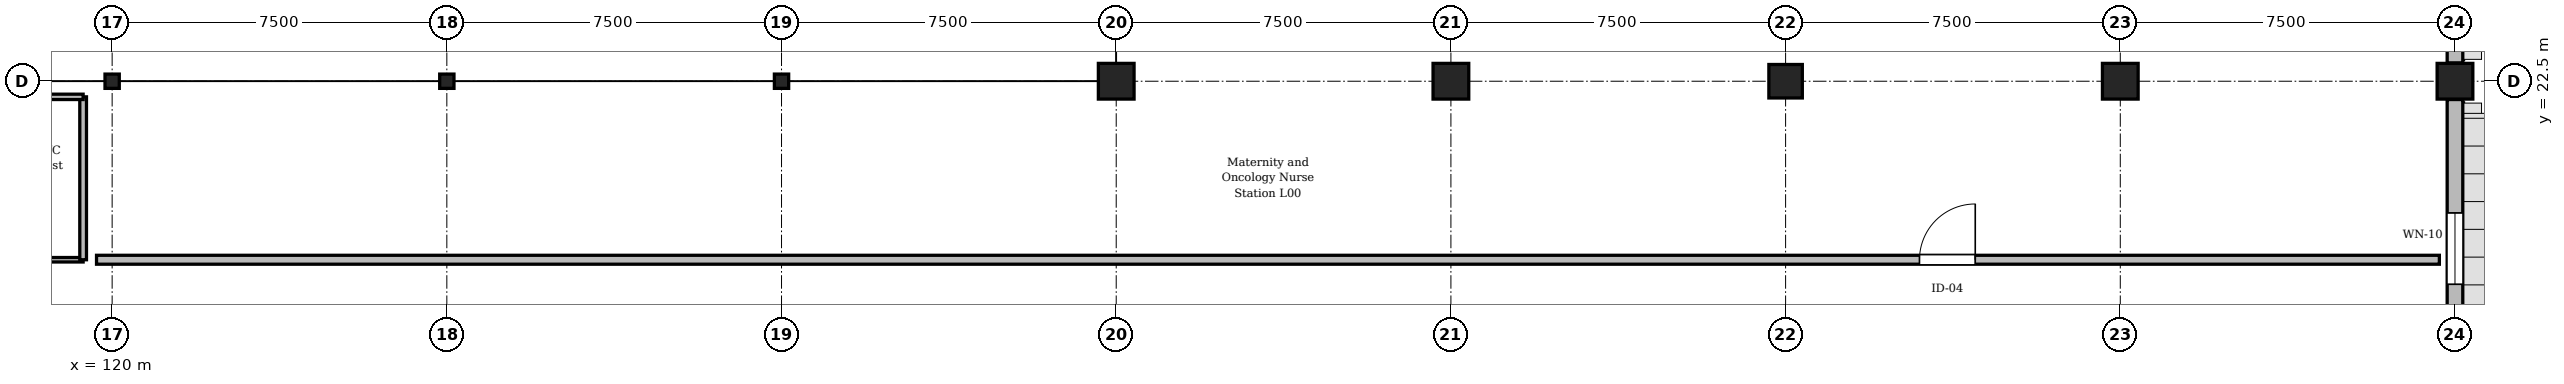
"""IFC4 building model, lengths in metres.
Left out: names, types, materials, properties, quantities, classifications, styles, units other than length and angle.
Written with IfcOpenShell. Run it as: python <this file> out.ifc"""

import sys

from ifc_helpers import new_model, si_unit, direction, frame, frame_2d, origin, origin_2d, place, context, subcontext, project, spatial, rectangle, circle, extrude, element, fill, save


model = new_model("IFC4")
c1 = context("Model", 3, precision=1e-05, world=origin(), true_north=direction((0.0, 1.0)))
c2 = subcontext(c1, "Body", "Model", "MODEL_VIEW")
j1 = project(units=[si_unit("LENGTHUNIT", "METRE"), si_unit("PLANEANGLEUNIT", "RADIAN")], contexts=[c1])
p1 = place(None, origin())
s1 = spatial("IfcSite", under=j1, at=p1, CompositionType="ELEMENT")
p2 = place(p1, origin())
s2 = spatial("IfcBuilding", under=s1, at=p2, CompositionType="ELEMENT")
p3 = place(p2, origin())
s3 = spatial("IfcBuildingStorey", under=s2, at=p3, CompositionType="ELEMENT", Elevation=0.0)
for number, where, z_axis, x_axis in (
    (1, (120.0, 22.5, 0.0), (0.0, 0.0, 1.0), (1.0, 0.0, 0.0)),
    (2, (127.5, 22.5, 0.0), (0.0, 0.0, 1.0), (1.0, 0.0, 0.0)),
    (3, (135.0, 22.5, 0.0), (0.0, 0.0, 1.0), (1.0, 0.0, 0.0)),
):
    element("IfcColumn", number, at=place(p3, frame(where, z_axis=z_axis, x_axis=x_axis)), inside=s3, PredefinedType="COLUMN", context=c2, shape_type="SweptSolid", body=[
        extrude(rectangle(XDim=0.32, YDim=0.32, at=origin_2d()), origin(), (0.0, 0.0, 1.0), 4.8),
    ])
for number, where, z_axis, x_axis in (
    (4, (142.5, 22.5, 0.0), (0.0, 0.0, 1.0), (1.0, 0.0, 0.0)),
    (5, (150.0, 22.5, 0.0), (0.0, 0.0, 1.0), (1.0, 0.0, 0.0)),
):
    element("IfcColumn", number, at=place(p3, frame(where, z_axis=z_axis, x_axis=x_axis)), inside=s3, PredefinedType="COLUMN", context=c2, shape_type="SweptSolid", body=[
        extrude(rectangle(XDim=0.8, YDim=0.8, at=origin_2d()), origin(), (0.0, 0.0, 1.0), 4.8),
    ])
p4 = place(p3, frame((157.5, 22.5, 0.0), z_axis=(0.0, 0.0, 1.0), x_axis=(1.0, 0.0, 0.0)))
e6 = element("IfcColumn", 6, at=p4, inside=s3, PredefinedType="COLUMN", context=c2, shape_type="SweptSolid", body=[
    extrude(circle(Radius=0.375, at=origin_2d()), origin(), (0.0, 0.0, 1.0), 4.8),
])
for number, where, z_axis, x_axis in (
    (7, (165.0, 22.5, 0.0), (0.0, 0.0, 1.0), (1.0, 0.0, 0.0)),
    (8, (172.5, 22.5, 0.0), (0.0, 0.0, 1.0), (1.0, 0.0, 0.0)),
):
    element("IfcColumn", number, at=place(p3, frame(where, z_axis=z_axis, x_axis=x_axis)), inside=s3, PredefinedType="COLUMN", context=c2, shape_type="SweptSolid", body=[
        extrude(rectangle(XDim=0.8, YDim=0.8, at=origin_2d()), origin(), (0.0, 0.0, 1.0), 4.8),
    ])
p5 = place(p3, frame((172.5, 22.09, 0.0), z_axis=(0.0, 0.0, 1.0), x_axis=(0.0, -1.0, 0.0)))
e9 = element("IfcWall", 9, at=p5, inside=s3, PredefinedType="STANDARD", context=c2, shape_type="SweptSolid", body=[
    extrude(rectangle(XDim=6.68, YDim=0.35, at=frame_2d((3.34, 0.0))), origin(), (0.0, 0.0, 1.0), 3.9),
])
p6 = place(p5, frame((2.54, 0.0, 0.9)))
e10 = element("IfcOpeningElement", 10, at=p6, cuts=e9, PredefinedType="OPENING", context=c2, shape_type="SweptSolid", body=[
    extrude(rectangle(XDim=1.6, YDim=1.95, at=frame_2d((0.8, 0.975))), frame((0.0, 0.185, 0.0), z_axis=(0.0, -1.0, 0.0), x_axis=(1.0, 0.0, 0.0)), (0.0, 0.0, 1.0), 0.37),
])
p7 = place(p3, frame((172.5, 31.165, 0.0), z_axis=(0.0, 0.0, 1.0), x_axis=(0.0, -1.0, 0.0)))
e11 = element("IfcWall", 11, at=p7, inside=s3, PredefinedType="STANDARD", context=c2, shape_type="SweptSolid", body=[
    extrude(rectangle(XDim=8.255, YDim=0.35, at=frame_2d((4.127, 0.0))), origin(), (0.0, 0.0, 1.0), 3.95),
])
p8 = place(p7, frame((3.228, 0.0, 0.9)))
e12 = element("IfcOpeningElement", 12, at=p8, cuts=e11, PredefinedType="OPENING", context=c2, shape_type="SweptSolid", body=[
    extrude(rectangle(XDim=1.8, YDim=1.95, at=frame_2d((0.9, 0.975))), frame((0.0, 0.185, 0.0), z_axis=(0.0, -1.0, 0.0), x_axis=(1.0, 0.0, 0.0)), (0.0, 0.0, 1.0), 0.37),
])
p9 = place(p3, frame((112.85, 18.5, 0.0), z_axis=(0.0, 0.0, 1.0), x_axis=(1.0, 0.0, 0.0)))
e13 = element("IfcWall", 13, at=p9, inside=s3, PredefinedType="PARTITIONING", context=c2, shape_type="SweptSolid", body=[
    extrude(rectangle(XDim=6.5, YDim=0.1, at=frame_2d((3.25, 0.0))), origin(), (0.0, 0.0, 1.0), 4.485),
])
p10 = place(p9, frame((2.775, 0.0, 0.0)))
e14 = element("IfcOpeningElement", 14, at=p10, cuts=e13, PredefinedType="OPENING", context=c2, shape_type="SweptSolid", body=[
    extrude(rectangle(XDim=0.95, YDim=2.15, at=frame_2d((0.475, 1.075))), frame((0.0, 0.06, 0.0), z_axis=(0.0, -1.0, 0.0), x_axis=(1.0, 0.0, 0.0)), (0.0, 0.0, 1.0), 0.12),
])
p11 = place(p3, frame((119.65, 18.5, 0.0), z_axis=(0.0, 0.0, 1.0), x_axis=(1.0, 0.0, 0.0)))
e15 = element("IfcWall", 15, at=p11, inside=s3, PredefinedType="STANDARD", context=c2, shape_type="SweptSolid", body=[
    extrude(rectangle(XDim=52.5, YDim=0.2, at=frame_2d((26.25, 0.0))), origin(), (0.0, 0.0, 1.0), 4.485),
])
p12 = place(p11, frame((40.85, 0.0, 0.0)))
e16 = element("IfcOpeningElement", 16, at=p12, cuts=e15, PredefinedType="OPENING", context=c2, shape_type="SweptSolid", body=[
    extrude(rectangle(XDim=1.25, YDim=2.2, at=frame_2d((0.625, 1.1))), frame((0.0, 0.11, 0.0), z_axis=(0.0, -1.0, 0.0), x_axis=(1.0, 0.0, 0.0)), (0.0, 0.0, 1.0), 0.22),
])
p13 = place(p3, frame((119.35, 18.5, 0.0), z_axis=(0.0, 0.0, 1.0), x_axis=(0.0, 1.0, 0.0)))
e17 = element("IfcWall", 17, at=p13, inside=s3, PredefinedType="PARTITIONING", context=c2, shape_type="SweptSolid", body=[
    extrude(rectangle(XDim=3.65, YDim=0.15, at=frame_2d((1.825, 0.0))), origin(), (0.0, 0.0, 1.0), 4.485),
])
p14 = place(p3, frame((112.85, 22.15, 0.0), z_axis=(0.0, 0.0, 1.0), x_axis=(1.0, 0.0, 0.0)))
e18 = element("IfcWall", 18, at=p14, inside=s3, PredefinedType="PARTITIONING", context=c2, shape_type="SweptSolid", body=[
    extrude(rectangle(XDim=6.5, YDim=0.12, at=frame_2d((3.25, 0.0))), origin(), (0.0, 0.0, 1.0), 3.885),
])
p15 = place(p6, origin())
e19 = element("IfcWindow", 19, at=p15, inside=s3, PartitioningType="SINGLE_PANEL", PredefinedType="WINDOW", context=c2, shape_type="SweptSolid", body=[
    extrude(rectangle(XDim=1.6, YDim=1.95, at=frame_2d((0.8, 0.975))), frame((0.0, 0.03, 0.0), z_axis=(0.0, -1.0, 0.0), x_axis=(1.0, 0.0, 0.0)), (0.0, 0.0, 1.0), 0.06),
])
fill(e10, e19)
p16 = place(p12, origin())
e20 = element("IfcDoor", 20, at=p16, inside=s3, OperationType="SINGLE_SWING_RIGHT", PredefinedType="DOOR", context=c2, shape_type="SweptSolid", body=[
    extrude(rectangle(XDim=1.25, YDim=2.2, at=frame_2d((0.625, 1.1))), frame((0.0, 0.025, 0.0), z_axis=(0.0, -1.0, 0.0), x_axis=(1.0, 0.0, 0.0)), (0.0, 0.0, 1.0), 0.05),
])
fill(e16, e20)
save(model, sys.argv[1])
